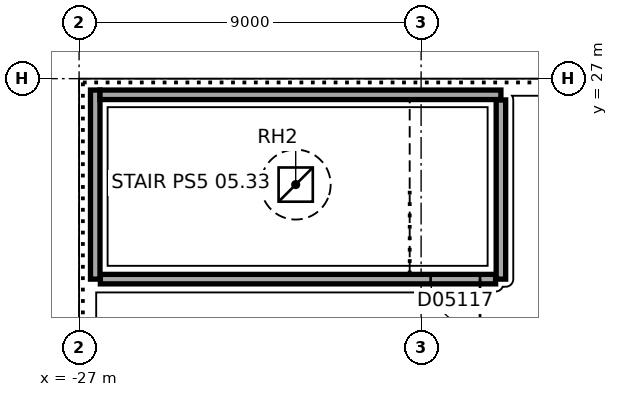
"""IFC4 building model, lengths in metres.
Left out: names, types, materials, properties, quantities, classifications, styles, units other than length and angle.
Written with IfcOpenShell. Run it as: python <this file> out.ifc"""

import sys

from ifc_helpers import new_model, si_unit, direction, frame, frame_2d, origin, origin_2d, place, context, subcontext, project, spatial, rectangle, extrude, element, fill, save


model = new_model("IFC4")
c1 = context("Model", 3, precision=1e-05, world=origin(), true_north=direction((0.0, 1.0)))
c2 = subcontext(c1, "Body", "Model", "MODEL_VIEW")
j1 = project(units=[si_unit("LENGTHUNIT", "METRE"), si_unit("PLANEANGLEUNIT", "RADIAN")], contexts=[c1])
p1 = place(None, origin())
s1 = spatial("IfcSite", under=j1, at=p1, CompositionType="ELEMENT")
p2 = place(p1, origin())
s2 = spatial("IfcBuilding", under=s1, at=p2, CompositionType="ELEMENT")
p3 = place(p2, frame((0.0, 0.0, 34.5)))
s3 = spatial("IfcBuildingStorey", under=s2, at=p3, CompositionType="ELEMENT", Elevation=34.5)
p4 = place(p3, frame((-3.136, 24.805, 0.0), z_axis=(0.0, 0.0, 1.0), x_axis=(-0.866028291626, -0.499994998079, 0.0)))
e1 = element("IfcWall", 1, at=p4, inside=s3, PredefinedType="STANDARD", context=c2, shape_type="SweptSolid", body=[
    extrude(rectangle(XDim=21.246, YDim=0.2, at=frame_2d((10.623, 0.0))), origin(), (0.0, 0.0, 1.0), 4.5),
])
p5 = place(p3, frame((-16.04, 21.725, 0.0), z_axis=(0.0, 0.0, 1.0), x_axis=(-1.0, 0.0, 0.0)))
e2 = element("IfcWall", 2, at=p5, inside=s3, PredefinedType="SOLIDWALL", context=c2, shape_type="SweptSolid", body=[
    extrude(rectangle(XDim=10.4, YDim=0.25, at=frame_2d((5.2, 0.0))), origin(), (0.0, 0.0, 1.0), 4.2),
])
p6 = place(p5, frame((0.41, 0.0, 0.0)))
e3 = element("IfcOpeningElement", 3, at=p6, cuts=e2, PredefinedType="OPENING", context=c2, shape_type="SweptSolid", body=[
    extrude(rectangle(XDim=1.3, YDim=2.1, at=frame_2d((0.65, 1.05))), frame((0.0, 0.135, 0.0), z_axis=(0.0, -1.0, 0.0), x_axis=(1.0, 0.0, 0.0)), (0.0, 0.0, 1.0), 0.27),
])
p7 = place(p3, frame((-15.9, 26.44, 0.0), z_axis=(0.0, 0.0, 1.0), x_axis=(0.0, -1.0, 0.0)))
e4 = element("IfcWall", 4, at=p7, inside=s3, PredefinedType="SOLIDWALL", context=c2, shape_type="SweptSolid", body=[
    extrude(rectangle(XDim=4.715, YDim=0.25, at=frame_2d((2.357, 0.0))), origin(), (0.0, 0.0, 1.0), 4.2),
])
p8 = place(p3, frame((-26.575, 21.725, 0.0), z_axis=(0.0, 0.0, 1.0), x_axis=(0.0, 1.0, 0.0)))
e5 = element("IfcWall", 5, at=p8, inside=s3, PredefinedType="SOLIDWALL", context=c2, shape_type="SweptSolid", body=[
    extrude(rectangle(XDim=4.975, YDim=0.25, at=frame_2d((2.487, 0.0))), origin(), (0.0, 0.0, 1.0), 4.2),
])
p9 = place(p3, frame((-26.45, 26.575, 0.0), z_axis=(0.0, 0.0, 1.0), x_axis=(1.0, 0.0, 0.0)))
e6 = element("IfcWall", 6, at=p9, inside=s3, PredefinedType="SOLIDWALL", context=c2, shape_type="SweptSolid", body=[
    extrude(rectangle(XDim=10.55, YDim=0.25, at=frame_2d((5.275, 0.0))), origin(), (0.0, 0.0, 1.0), 4.2),
])
p10 = place(p6, origin())
e7 = element("IfcDoor", 7, at=p10, inside=s3, OperationType="SINGLE_SWING_LEFT", PredefinedType="DOOR", context=c2, shape_type="SweptSolid", body=[
    extrude(rectangle(XDim=1.3, YDim=2.1, at=frame_2d((0.65, 1.05))), frame((0.0, 0.025, 0.0), z_axis=(0.0, -1.0, 0.0), x_axis=(1.0, 0.0, 0.0)), (0.0, 0.0, 1.0), 0.05),
])
fill(e3, e7)
p11 = place(p3, frame((0.0, 0.0, 3.95)))
p12 = place(p11, frame((-21.3, 24.212, -0.01)))
p13 = place(p12, frame((0.0, 0.0, 0.21)))
e8 = element("IfcWindow", 8, at=p13, inside=s3, PartitioningType="SINGLE_PANEL", PredefinedType="SKYLIGHT", context=c2, shape_type="SweptSolid", body=[
    extrude(rectangle(XDim=0.9, YDim=0.9, at=origin_2d()), origin(), (0.0, 0.0, 1.0), 0.05),
])
save(model, sys.argv[1])
